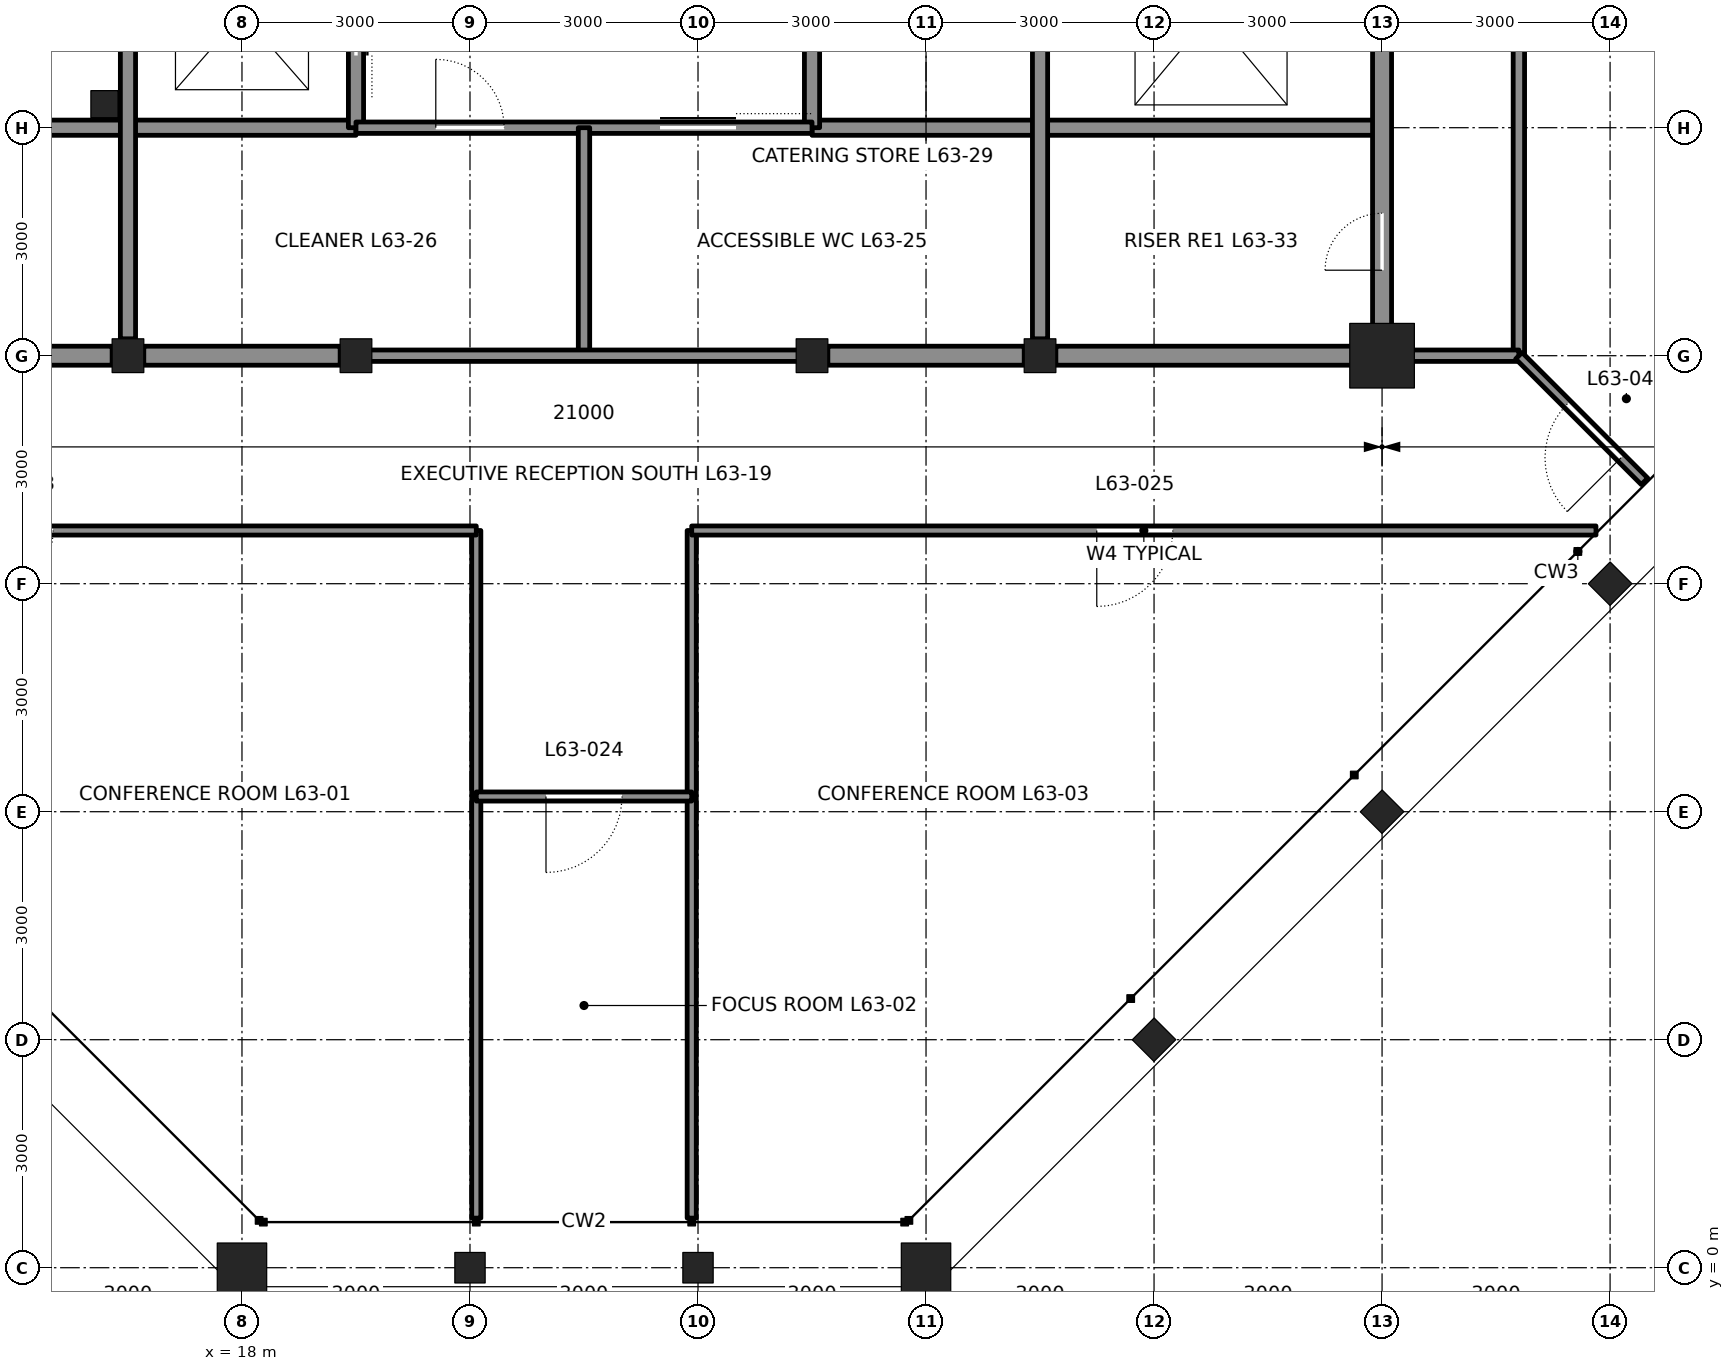
"""IFC4 building model, lengths in metres.
Left out: names, types, materials, properties, quantities, classifications, styles, units other than length and angle.
Written with IfcOpenShell. Run it as: python <this file> out.ifc"""

import sys

from ifc_helpers import new_model, si_unit, direction, frame, frame_2d, origin, origin_2d, place, context, subcontext, project, spatial, rectangle, hollow_rectangle, i_section, extrude, element, fill, save


model = new_model("IFC4")
c1 = context("Model", 3, precision=1e-05, world=origin(), true_north=direction((0.0, 1.0)))
c2 = subcontext(c1, "Body", "Model", "MODEL_VIEW")
j1 = project(units=[si_unit("LENGTHUNIT", "METRE"), si_unit("PLANEANGLEUNIT", "RADIAN")], contexts=[c1])
p1 = place(None, origin())
s1 = spatial("IfcSite", under=j1, at=p1, CompositionType="ELEMENT")
p2 = place(p1, origin())
s2 = spatial("IfcBuilding", under=s1, at=p2, CompositionType="ELEMENT")
p3 = place(p2, frame((0.0, 0.0, 283.2)))
s3 = spatial("IfcBuildingStorey", under=s2, at=p3, CompositionType="ELEMENT", Elevation=283.2)
p4 = place(p3, frame((18.0, 0.0, 0.0), z_axis=(0.0, 0.0, 1.0), x_axis=(0.0, -1.0, 0.0)))
e1 = element("IfcColumn", 1, at=p4, inside=s3, PredefinedType="COLUMN", context=c2, shape_type="SweptSolid", body=[
    extrude(hollow_rectangle(XDim=0.65, YDim=0.65, WallThickness=0.065, at=origin_2d()), origin(), (0.0, 0.0, 1.0), 4.2),
])
for number, where, z_axis, x_axis in (
    (2, (21.0, 0.0, 0.0), (0.0, 0.0, 1.0), (0.0, -1.0, 0.0)),
    (3, (24.0, 0.0, 0.0), (0.0, 0.0, 1.0), (0.0, -1.0, 0.0)),
):
    element("IfcColumn", number, at=place(p3, frame(where, z_axis=z_axis, x_axis=x_axis)), inside=s3, PredefinedType="COLUMN", context=c2, shape_type="SweptSolid", body=[
        extrude(i_section(OverallWidth=0.401, OverallDepth=0.399, WebThickness=0.025, FlangeThickness=0.04, at=origin_2d()), origin(), (0.0, 0.0, 1.0), 4.2),
    ])
p5 = place(p3, frame((27.0, 0.0, 0.0), z_axis=(0.0, 0.0, 1.0), x_axis=(0.0, -1.0, 0.0)))
e4 = element("IfcColumn", 4, at=p5, inside=s3, PredefinedType="COLUMN", context=c2, shape_type="SweptSolid", body=[
    extrude(hollow_rectangle(XDim=0.65, YDim=0.65, WallThickness=0.065, at=origin_2d()), origin(), (0.0, 0.0, 1.0), 4.2),
])
for number, where, z_axis, x_axis in (
    (5, (30.0, 3.0, 0.0), (0.0, 0.0, 1.0), (0.707, -0.707, 0.0)),
    (6, (33.0, 6.0, 0.0), (0.0, 0.0, 1.0), (0.707, -0.707, 0.0)),
    (7, (36.0, 9.0, 0.0), (0.0, 0.0, 1.0), (0.707, -0.707, 0.0)),
):
    element("IfcColumn", number, at=place(p3, frame(where, z_axis=z_axis, x_axis=x_axis)), inside=s3, PredefinedType="COLUMN", context=c2, shape_type="SweptSolid", body=[
        extrude(i_section(OverallWidth=0.404, OverallDepth=0.406, WebThickness=0.027, FlangeThickness=0.044, at=origin_2d()), origin(), (0.0, 0.0, 1.0), 4.2),
    ])
for number, where, z_axis, x_axis in (
    (8, (16.5, 12.0, 0.0), (0.0, 0.0, 1.0), (1.0, 0.0, 0.0)),
    (9, (19.5, 12.0, 0.0), (0.0, 0.0, 1.0), (1.0, 0.0, 0.0)),
    (10, (25.5, 12.0, 0.0), (0.0, 0.0, 1.0), (1.0, 0.0, 0.0)),
    (11, (28.5, 12.0, 0.0), (0.0, 0.0, 1.0), (1.0, 0.0, 0.0)),
):
    element("IfcColumn", number, at=place(p3, frame(where, z_axis=z_axis, x_axis=x_axis)), inside=s3, PredefinedType="COLUMN", context=c2, shape_type="SweptSolid", body=[
        extrude(i_section(OverallWidth=0.417, OverallDepth=0.445, WebThickness=0.039, FlangeThickness=0.063, at=origin_2d()), origin(), (0.0, 0.0, 1.0), 4.2),
    ])
p6 = place(p3, frame((33.0, 12.0, 0.0), z_axis=(0.0, 0.0, 1.0), x_axis=(1.0, 0.0, 0.0)))
e12 = element("IfcColumn", 12, at=p6, inside=s3, PredefinedType="COLUMN", context=c2, shape_type="SweptSolid", body=[
    extrude(hollow_rectangle(XDim=0.85, YDim=0.85, WallThickness=0.085, at=origin_2d()), origin(), (0.0, 0.0, 1.0), 4.2),
])
p7 = place(p3, frame((12.25, 12.0, 0.0), z_axis=(0.0, 0.0, 1.0), x_axis=(1.0, 0.0, 0.0)))
e13 = element("IfcWall", 13, at=p7, inside=s3, PredefinedType="SOLIDWALL", context=c2, shape_type="SweptSolid", body=[
    extrude(rectangle(XDim=4.042, YDim=0.25, at=frame_2d((2.021, 0.0))), origin(), (0.0, 0.0, 1.0), 3.182),
])
for number, where, z_axis, x_axis in (
    (14, (16.708, 12.0, 0.0), (0.0, 0.0, 1.0), (1.0, 0.0, 0.0)),
    (15, (25.708, 12.0, 0.0), (0.0, 0.0, 1.0), (1.0, 0.0, 0.0)),
):
    element("IfcWall", number, at=place(p3, frame(where, z_axis=z_axis, x_axis=x_axis)), inside=s3, PredefinedType="SOLIDWALL", context=c2, shape_type="SweptSolid", body=[
        extrude(rectangle(XDim=2.583, YDim=0.25, at=frame_2d((1.292, 0.0))), origin(), (0.0, 0.0, 1.0), 3.182),
    ])
p8 = place(p3, frame((28.708, 12.0, 0.0), z_axis=(0.0, 0.0, 1.0), x_axis=(1.0, 0.0, 0.0)))
e16 = element("IfcWall", 16, at=p8, inside=s3, PredefinedType="SOLIDWALL", context=c2, shape_type="SweptSolid", body=[
    extrude(rectangle(XDim=4.042, YDim=0.25, at=frame_2d((2.021, 0.0))), origin(), (0.0, 0.0, 1.0), 3.182),
])
for number, where, z_axis, x_axis in (
    (17, (12.0, 15.0, 0.0), (0.0, 0.0, 1.0), (1.0, 0.0, 0.0)),
    (18, (25.5, 15.0, 0.0), (0.0, 0.0, 1.0), (1.0, 0.0, 0.0)),
):
    element("IfcWall", number, at=place(p3, frame(where, z_axis=z_axis, x_axis=x_axis)), inside=s3, PredefinedType="SOLIDWALL", context=c2, shape_type="SweptSolid", body=[
        extrude(rectangle(XDim=7.5, YDim=0.2, at=frame_2d((3.75, 0.0))), origin(), (0.0, 0.0, 1.0), 4.04),
    ])
p9 = place(p3, frame((16.5, 12.222, 0.0), z_axis=(0.0, 0.0, 1.0), x_axis=(0.0, 1.0, 0.0)))
e19 = element("IfcWall", 19, at=p9, inside=s3, PredefinedType="SOLIDWALL", context=c2, shape_type="SweptSolid", body=[
    extrude(rectangle(XDim=8.555, YDim=0.2, at=frame_2d((4.278, 0.0))), origin(), (0.0, 0.0, 1.0), 3.113),
])
p10 = place(p3, frame((19.5, 15.0, 0.0), z_axis=(0.0, 0.0, 1.0), x_axis=(0.0, 1.0, 0.0)))
e20 = element("IfcWall", 20, at=p10, inside=s3, PredefinedType="SOLIDWALL", context=c2, shape_type="SweptSolid", body=[
    extrude(rectangle(XDim=12.0, YDim=0.2, at=frame_2d((6.0, 0.0))), origin(), (0.0, 0.0, 1.0), 3.065),
])
p11 = place(p10, frame((0.95, 0.0, 0.0)))
e21 = element("IfcOpeningElement", 21, at=p11, cuts=e20, PredefinedType="OPENING", context=c2, shape_type="SweptSolid", body=[
    extrude(rectangle(XDim=1.1, YDim=2.1, at=frame_2d((0.55, 1.05))), frame((0.0, 0.11, 0.0), z_axis=(0.0, -1.0, 0.0), x_axis=(1.0, 0.0, 0.0)), (0.0, 0.0, 1.0), 0.22),
])
p12 = place(p10, frame((3.95, 0.0, 0.0)))
e22 = element("IfcOpeningElement", 22, at=p12, cuts=e20, PredefinedType="OPENING", context=c2, shape_type="SweptSolid", body=[
    extrude(rectangle(XDim=1.1, YDim=2.1, at=frame_2d((0.55, 1.05))), frame((0.0, 0.11, 0.0), z_axis=(0.0, -1.0, 0.0), x_axis=(1.0, 0.0, 0.0)), (0.0, 0.0, 1.0), 0.22),
])
p13 = place(p10, frame((6.95, 0.0, 0.0)))
e23 = element("IfcOpeningElement", 23, at=p13, cuts=e20, PredefinedType="OPENING", context=c2, shape_type="SweptSolid", body=[
    extrude(rectangle(XDim=1.1, YDim=2.1, at=frame_2d((0.55, 1.05))), frame((0.0, 0.11, 0.0), z_axis=(0.0, -1.0, 0.0), x_axis=(1.0, 0.0, 0.0)), (0.0, 0.0, 1.0), 0.22),
])
p14 = place(p10, frame((9.95, 0.0, 0.0)))
e24 = element("IfcOpeningElement", 24, at=p14, cuts=e20, PredefinedType="OPENING", context=c2, shape_type="SweptSolid", body=[
    extrude(rectangle(XDim=1.1, YDim=2.1, at=frame_2d((0.55, 1.05))), frame((0.0, 0.11, 0.0), z_axis=(0.0, -1.0, 0.0), x_axis=(1.0, 0.0, 0.0)), (0.0, 0.0, 1.0), 0.22),
])
p15 = place(p3, frame((25.5, 15.0, 0.0), z_axis=(0.0, 0.0, 1.0), x_axis=(0.0, 1.0, 0.0)))
e25 = element("IfcWall", 25, at=p15, inside=s3, PredefinedType="SOLIDWALL", context=c2, shape_type="SweptSolid", body=[
    extrude(rectangle(XDim=12.0, YDim=0.2, at=frame_2d((6.0, 0.0))), origin(), (0.0, 0.0, 1.0), 3.065),
])
p16 = place(p15, frame((1.8, 0.0, 0.0)))
e26 = element("IfcOpeningElement", 26, at=p16, cuts=e25, PredefinedType="OPENING", context=c2, shape_type="SweptSolid", body=[
    extrude(rectangle(XDim=0.9, YDim=2.1, at=frame_2d((0.45, 1.05))), frame((0.0, 0.11, 0.0), z_axis=(0.0, -1.0, 0.0), x_axis=(1.0, 0.0, 0.0)), (0.0, 0.0, 1.0), 0.22),
])
p17 = place(p15, frame((4.8, 0.0, 0.0)))
e27 = element("IfcOpeningElement", 27, at=p17, cuts=e25, PredefinedType="OPENING", context=c2, shape_type="SweptSolid", body=[
    extrude(rectangle(XDim=0.9, YDim=2.1, at=frame_2d((0.45, 1.05))), frame((0.0, 0.11, 0.0), z_axis=(0.0, -1.0, 0.0), x_axis=(1.0, 0.0, 0.0)), (0.0, 0.0, 1.0), 0.22),
])
p18 = place(p3, frame((28.5, 12.222, 0.0), z_axis=(0.0, 0.0, 1.0), x_axis=(0.0, 1.0, 0.0)))
e28 = element("IfcWall", 28, at=p18, inside=s3, PredefinedType="SOLIDWALL", context=c2, shape_type="SweptSolid", body=[
    extrude(rectangle(XDim=8.555, YDim=0.2, at=frame_2d((4.278, 0.0))), origin(), (0.0, 0.0, 1.0), 3.113),
])
p19 = place(p3, frame((33.0, 12.25, 0.0), z_axis=(0.0, 0.0, 1.0), x_axis=(0.0, 1.0, 0.0)))
e29 = element("IfcWall", 29, at=p19, inside=s3, PredefinedType="SOLIDWALL", context=c2, shape_type="SweptSolid", body=[
    extrude(rectangle(XDim=8.528, YDim=0.25, at=frame_2d((4.264, 0.0))), origin(), (0.0, 0.0, 1.0), 3.113),
])
p20 = place(p19, frame((6.65, 0.0, 0.0)))
e30 = element("IfcOpeningElement", 30, at=p20, cuts=e29, PredefinedType="OPENING", context=c2, shape_type="SweptSolid", body=[
    extrude(rectangle(XDim=1.2, YDim=2.1, at=frame_2d((0.6, 1.05))), frame((0.0, 0.135, 0.0), z_axis=(0.0, -1.0, 0.0), x_axis=(1.0, 0.0, 0.0)), (0.0, 0.0, 1.0), 0.27),
])
p21 = place(p19, frame((0.875, 0.0, 0.0)))
e31 = element("IfcOpeningElement", 31, at=p21, cuts=e29, PredefinedType="OPENING", context=c2, shape_type="SweptSolid", body=[
    extrude(rectangle(XDim=0.75, YDim=2.1, at=frame_2d((0.375, 1.05))), frame((0.0, 0.135, 0.0), z_axis=(0.0, -1.0, 0.0), x_axis=(1.0, 0.0, 0.0)), (0.0, 0.0, 1.0), 0.27),
])
p22 = place(p3, frame((19.5, 15.0, 0.0), z_axis=(0.0, 0.0, 1.0), x_axis=(1.0, 0.0, 0.0)))
e32 = element("IfcWall", 32, at=p22, inside=s3, PredefinedType="PARTITIONING", context=c2, shape_type="SweptSolid", body=[
    extrude(rectangle(XDim=6.0, YDim=0.15, at=frame_2d((3.0, 0.0))), origin(), (0.0, 0.0, 1.0), 4.04),
])
p23 = place(p22, frame((4.0, 0.0, 0.0)))
e33 = element("IfcOpeningElement", 33, at=p23, cuts=e32, PredefinedType="OPENING", context=c2, shape_type="SweptSolid", body=[
    extrude(rectangle(XDim=1.0, YDim=2.1, at=frame_2d((0.5, 1.05))), frame((0.0, 0.085, 0.0), z_axis=(0.0, -1.0, 0.0), x_axis=(1.0, 0.0, 0.0)), (0.0, 0.0, 1.0), 0.17),
])
p24 = place(p22, frame((1.05, 0.0, 0.0)))
e34 = element("IfcOpeningElement", 34, at=p24, cuts=e32, PredefinedType="OPENING", context=c2, shape_type="SweptSolid", body=[
    extrude(rectangle(XDim=0.9, YDim=2.1, at=frame_2d((0.45, 1.05))), frame((0.0, 0.085, 0.0), z_axis=(0.0, -1.0, 0.0), x_axis=(1.0, 0.0, 0.0)), (0.0, 0.0, 1.0), 0.17),
])
p25 = place(p3, frame((22.5, 15.0, 0.0), z_axis=(0.0, 0.0, 1.0), x_axis=(0.0, -1.0, 0.0)))
e35 = element("IfcWall", 35, at=p25, inside=s3, PredefinedType="PARTITIONING", context=c2, shape_type="SweptSolid", body=[
    extrude(rectangle(XDim=3.0, YDim=0.15, at=frame_2d((1.5, 0.0))), origin(), (0.0, 0.0, 1.0), 4.04),
])
p26 = place(p3, frame((19.5, 12.0, 0.0), z_axis=(0.0, 0.0, 1.0), x_axis=(1.0, 0.0, 0.0)))
e36 = element("IfcWall", 36, at=p26, inside=s3, PredefinedType="PARTITIONING", context=c2, shape_type="SweptSolid", body=[
    extrude(rectangle(XDim=6.0, YDim=0.15, at=frame_2d((3.0, 0.0))), origin(), (0.0, 0.0, 1.0), 3.182),
])
for number, where, z_axis, x_axis in (
    (37, (21.083, 0.653, 0.0), (0.0, 0.0, 1.0), (0.0, 1.0, 0.0)),
    (38, (23.917, 0.653, 0.0), (0.0, 0.0, 1.0), (0.0, 1.0, 0.0)),
):
    element("IfcWall", number, at=place(p3, frame(where, z_axis=z_axis, x_axis=x_axis)), inside=s3, PredefinedType="PARTITIONING", context=c2, shape_type="SweptSolid", body=[
        extrude(rectangle(XDim=9.047, YDim=0.12, at=frame_2d((4.524, 0.0))), origin(), (0.0, 0.0, 1.0), 3.357),
    ])
p27 = place(p3, frame((9.186, 9.7, 0.0), z_axis=(0.0, 0.0, 1.0), x_axis=(1.0, 0.0, 0.0)))
e39 = element("IfcWall", 39, at=p27, inside=s3, PredefinedType="PARTITIONING", context=c2, shape_type="SweptSolid", body=[
    extrude(rectangle(XDim=11.897, YDim=0.12, at=frame_2d((5.949, 0.0))), origin(), (0.0, 0.0, 1.0), 4.04),
])
p28 = place(p27, frame((5.329, 0.0, 0.0)))
e40 = element("IfcOpeningElement", 40, at=p28, cuts=e39, PredefinedType="OPENING", context=c2, shape_type="SweptSolid", body=[
    extrude(rectangle(XDim=1.0, YDim=2.4, at=frame_2d((0.5, 1.2))), frame((0.0, 0.07, 0.0), z_axis=(0.0, -1.0, 0.0), x_axis=(1.0, 0.0, 0.0)), (0.0, 0.0, 1.0), 0.14),
])
p29 = place(p3, frame((21.083, 6.2, 0.0), z_axis=(0.0, 0.0, 1.0), x_axis=(1.0, 0.0, 0.0)))
e41 = element("IfcWall", 41, at=p29, inside=s3, PredefinedType="PARTITIONING", context=c2, shape_type="SweptSolid", body=[
    extrude(rectangle(XDim=2.834, YDim=0.12, at=frame_2d((1.417, 0.0))), origin(), (0.0, 0.0, 1.0), 4.04),
])
p30 = place(p29, frame((0.917, 0.0, 0.0)))
e42 = element("IfcOpeningElement", 42, at=p30, cuts=e41, PredefinedType="OPENING", context=c2, shape_type="SweptSolid", body=[
    extrude(rectangle(XDim=1.0, YDim=2.4, at=frame_2d((0.5, 1.2))), frame((0.0, 0.07, 0.0), z_axis=(0.0, -1.0, 0.0), x_axis=(1.0, 0.0, 0.0)), (0.0, 0.0, 1.0), 0.14),
])
p31 = place(p3, frame((23.917, 9.7, 0.0), z_axis=(0.0, 0.0, 1.0), x_axis=(1.0, 0.0, 0.0)))
e43 = element("IfcWall", 43, at=p31, inside=s3, PredefinedType="PARTITIONING", context=c2, shape_type="SweptSolid", body=[
    extrude(rectangle(XDim=11.897, YDim=0.12, at=frame_2d((5.949, 0.0))), origin(), (0.0, 0.0, 1.0), 4.04),
])
p32 = place(p31, frame((5.329, 0.0, 0.0)))
e44 = element("IfcOpeningElement", 44, at=p32, cuts=e43, PredefinedType="OPENING", context=c2, shape_type="SweptSolid", body=[
    extrude(rectangle(XDim=1.0, YDim=2.4, at=frame_2d((0.5, 1.2))), frame((0.0, 0.07, 0.0), z_axis=(0.0, -1.0, 0.0), x_axis=(1.0, 0.0, 0.0)), (0.0, 0.0, 1.0), 0.14),
])
p33 = place(p3, frame((34.8, 12.0, 0.0), z_axis=(0.0, 0.0, 1.0), x_axis=(0.0, 1.0, 0.0)))
e45 = element("IfcWall", 45, at=p33, inside=s3, PredefinedType="PARTITIONING", context=c2, shape_type="SweptSolid", body=[
    extrude(rectangle(XDim=24.314, YDim=0.15, at=frame_2d((12.157, 0.0))), origin(), (0.0, 0.0, 1.0), 4.04),
])
p34 = place(p33, frame((11.5, 0.0, 0.0)))
e46 = element("IfcOpeningElement", 46, at=p34, cuts=e45, PredefinedType="OPENING", context=c2, shape_type="SweptSolid", body=[
    extrude(rectangle(XDim=1.0, YDim=2.4, at=frame_2d((0.5, 1.2))), frame((0.0, 0.085, 0.0), z_axis=(0.0, -1.0, 0.0), x_axis=(1.0, 0.0, 0.0)), (0.0, 0.0, 1.0), 0.17),
])
p35 = place(p3, frame((33.0, 12.0, 0.0), z_axis=(0.0, 0.0, 1.0), x_axis=(1.0, 0.0, 0.0)))
e47 = element("IfcWall", 47, at=p35, inside=s3, PredefinedType="PARTITIONING", context=c2, shape_type="SweptSolid", body=[
    extrude(rectangle(XDim=1.8, YDim=0.15, at=frame_2d((0.9, 0.0))), origin(), (0.0, 0.0, 1.0), 3.271),
])
p36 = place(p3, frame((34.8, 12.0, 0.0), z_axis=(0.0, 0.0, 1.0), x_axis=(0.707106781187, -0.707106781187, 0.0)))
e48 = element("IfcWall", 48, at=p36, inside=s3, PredefinedType="PARTITIONING", context=c2, shape_type="SweptSolid", body=[
    extrude(rectangle(XDim=2.338, YDim=0.12, at=frame_2d((1.169, 0.0))), origin(), (0.0, 0.0, 1.0), 4.04),
])
p37 = place(p36, frame((0.9, 0.0, 0.0)))
e49 = element("IfcOpeningElement", 49, at=p37, cuts=e48, PredefinedType="OPENING", context=c2, shape_type="SweptSolid", body=[
    extrude(rectangle(XDim=1.0, YDim=2.4, at=frame_2d((0.5, 1.2))), frame((0.0, 0.07, 0.0), z_axis=(0.0, -1.0, 0.0), x_axis=(1.0, 0.0, 0.0)), (0.0, 0.0, 1.0), 0.14),
])
p38 = place(p3, frame((16.19, 15.31, 0.0), z_axis=(0.0, 0.0, 1.0), x_axis=(1.0, 0.0, 0.0)))
e50 = element("IfcColumn", 50, at=p38, inside=s3, PredefinedType="COLUMN", context=c2, shape_type="SweptSolid", body=[
    extrude(hollow_rectangle(XDim=0.356, YDim=0.356, WallThickness=0.009, at=origin_2d()), origin(), (0.0, 0.0, 1.0), 4.2),
])
p39 = place(p21, origin())
e51 = element("IfcDoor", 51, at=p39, inside=s3, OperationType="SINGLE_SWING_LEFT", PredefinedType="DOOR", context=c2, shape_type="SweptSolid", body=[
    extrude(rectangle(XDim=0.75, YDim=2.1, at=frame_2d((0.375, 1.05))), frame((0.0, 0.025, 0.0), z_axis=(0.0, -1.0, 0.0), x_axis=(1.0, 0.0, 0.0)), (0.0, 0.0, 1.0), 0.05),
])
fill(e31, e51)
p40 = place(p23, origin())
e52 = element("IfcDoor", 52, at=p40, inside=s3, OperationType="SLIDING_TO_LEFT", PredefinedType="DOOR", context=c2, shape_type="SweptSolid", body=[
    extrude(rectangle(XDim=1.0, YDim=2.1, at=frame_2d((0.5, 1.05))), frame((0.0, 0.025, 0.0), z_axis=(0.0, -1.0, 0.0), x_axis=(1.0, 0.0, 0.0)), (0.0, 0.0, 1.0), 0.05),
])
fill(e33, e52)
p41 = place(p24, origin())
e53 = element("IfcDoor", 53, at=p41, inside=s3, OperationType="SINGLE_SWING_LEFT", PredefinedType="DOOR", context=c2, shape_type="SweptSolid", body=[
    extrude(rectangle(XDim=0.9, YDim=2.1, at=frame_2d((0.45, 1.05))), frame((0.0, 0.025, 0.0), z_axis=(0.0, -1.0, 0.0), x_axis=(1.0, 0.0, 0.0)), (0.0, 0.0, 1.0), 0.05),
])
fill(e34, e53)
p42 = place(p11, origin())
e54 = element("IfcDoor", 54, at=p42, inside=s3, OperationType="DOUBLE_DOOR_SLIDING", PredefinedType="DOOR", context=c2, shape_type="SweptSolid", body=[
    extrude(rectangle(XDim=1.1, YDim=2.1, at=frame_2d((0.55, 1.05))), frame((0.0, 0.025, 0.0), z_axis=(0.0, -1.0, 0.0), x_axis=(1.0, 0.0, 0.0)), (0.0, 0.0, 1.0), 0.05),
])
fill(e21, e54)
p43 = place(p28, frame((1.0, 0.0, 0.0), z_axis=(0.0, 0.0, 1.0), x_axis=(-1.0, 0.0, 0.0)))
e55 = element("IfcDoor", 55, at=p43, inside=s3, OperationType="SINGLE_SWING_RIGHT", PredefinedType="DOOR", context=c2, shape_type="SweptSolid", body=[
    extrude(rectangle(XDim=1.0, YDim=2.4, at=frame_2d((0.5, 1.2))), frame((0.0, 0.025, 0.0), z_axis=(0.0, -1.0, 0.0), x_axis=(1.0, 0.0, 0.0)), (0.0, 0.0, 1.0), 0.05),
])
fill(e40, e55)
p44 = place(p30, frame((1.0, 0.0, 0.0), z_axis=(0.0, 0.0, 1.0), x_axis=(-1.0, 0.0, 0.0)))
e56 = element("IfcDoor", 56, at=p44, inside=s3, OperationType="SINGLE_SWING_RIGHT", PredefinedType="DOOR", context=c2, shape_type="SweptSolid", body=[
    extrude(rectangle(XDim=1.0, YDim=2.4, at=frame_2d((0.5, 1.2))), frame((0.0, 0.025, 0.0), z_axis=(0.0, -1.0, 0.0), x_axis=(1.0, 0.0, 0.0)), (0.0, 0.0, 1.0), 0.05),
])
fill(e42, e56)
p45 = place(p32, frame((1.0, 0.0, 0.0), z_axis=(0.0, 0.0, 1.0), x_axis=(-1.0, 0.0, 0.0)))
e57 = element("IfcDoor", 57, at=p45, inside=s3, OperationType="SINGLE_SWING_RIGHT", PredefinedType="DOOR", context=c2, shape_type="SweptSolid", body=[
    extrude(rectangle(XDim=1.0, YDim=2.4, at=frame_2d((0.5, 1.2))), frame((0.0, 0.025, 0.0), z_axis=(0.0, -1.0, 0.0), x_axis=(1.0, 0.0, 0.0)), (0.0, 0.0, 1.0), 0.05),
])
fill(e44, e57)
p46 = place(p37, frame((1.0, 0.0, 0.0), z_axis=(0.0, 0.0, 1.0), x_axis=(-1.0, 0.0, 0.0)))
e58 = element("IfcDoor", 58, at=p46, inside=s3, OperationType="SINGLE_SWING_LEFT", PredefinedType="DOOR", context=c2, shape_type="SweptSolid", body=[
    extrude(rectangle(XDim=1.0, YDim=2.4, at=frame_2d((0.5, 1.2))), frame((0.0, 0.025, 0.0), z_axis=(0.0, -1.0, 0.0), x_axis=(1.0, 0.0, 0.0)), (0.0, 0.0, 1.0), 0.05),
])
fill(e49, e58)
save(model, sys.argv[1])
